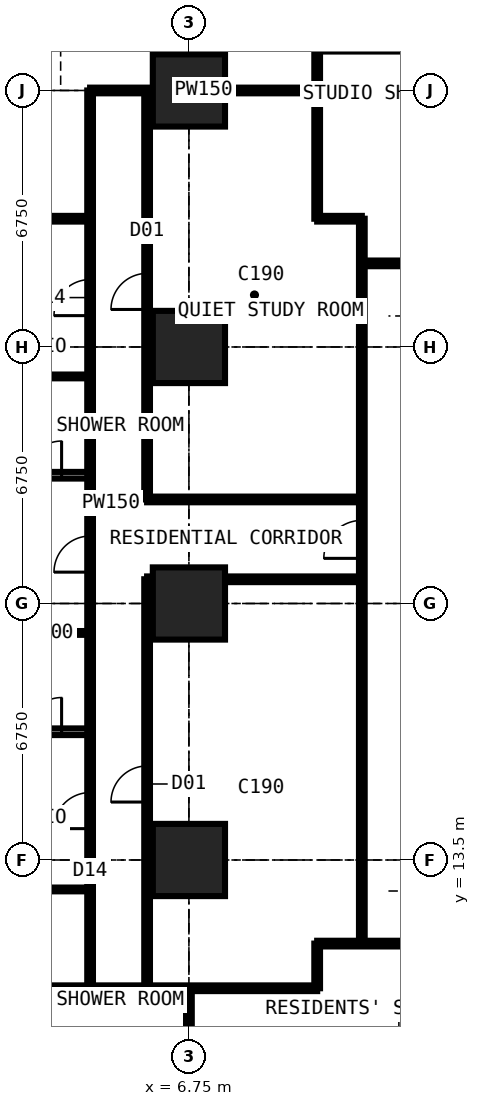
"""IFC4 building model, lengths in metres.
Left out: names, types, materials, properties, quantities, classifications, styles, units other than length and angle.
Written with IfcOpenShell. Run it as: python <this file> out.ifc"""

import sys

from ifc_helpers import new_model, si_unit, direction, frame, frame_2d, origin, origin_2d, place, context, subcontext, project, spatial, rectangle, extrude, element, fill, save


model = new_model("IFC4")
c1 = context("Model", 3, precision=1e-05, world=origin(), true_north=direction((0.0, 1.0)))
c2 = subcontext(c1, "Body", "Model", "MODEL_VIEW")
j1 = project(units=[si_unit("LENGTHUNIT", "METRE"), si_unit("PLANEANGLEUNIT", "RADIAN")], contexts=[c1])
p1 = place(None, origin())
s1 = spatial("IfcSite", under=j1, at=p1, CompositionType="ELEMENT")
p2 = place(p1, origin())
s2 = spatial("IfcBuilding", under=s1, at=p2, CompositionType="ELEMENT")
p3 = place(p2, frame((0.0, 0.0, 39.6)))
s3 = spatial("IfcBuildingStorey", under=s2, at=p3, CompositionType="ELEMENT", Elevation=39.6)
for number, where, z_axis, x_axis in (
    (1, (6.75, 13.5, 0.0), (0.0, 0.0, 1.0), (1.0, 0.0, 0.0)),
    (2, (6.75, 20.25, 0.0), (0.0, 0.0, 1.0), (1.0, 0.0, 0.0)),
    (3, (6.75, 27.0, 0.0), (0.0, 0.0, 1.0), (1.0, 0.0, 0.0)),
    (4, (6.75, 33.75, 0.0), (0.0, 0.0, 1.0), (1.0, 0.0, 0.0)),
):
    element("IfcColumn", number, at=place(p3, frame(where, z_axis=z_axis, x_axis=x_axis)), inside=s3, PredefinedType="COLUMN", context=c2, shape_type="SweptSolid", body=[
        extrude(rectangle(XDim=1.9, YDim=1.9, at=origin_2d()), origin(), (0.0, 0.0, 1.0), 3.6),
    ])
p4 = place(p3, frame((-0.734, 10.125, 0.0), z_axis=(0.0, 0.0, 1.0), x_axis=(1.0, 0.0, 0.0)))
e5 = element("IfcWall", 5, at=p4, inside=s3, PredefinedType="PARTITIONING", context=c2, shape_type="SweptSolid", body=[
    extrude(rectangle(XDim=10.859, YDim=0.15, at=frame_2d((5.429, 0.0))), origin(), (0.0, 0.0, 1.0), 3.375),
])
p5 = place(p3, frame((-0.734, 16.875, 0.0), z_axis=(0.0, 0.0, 1.0), x_axis=(1.0, 0.0, 0.0)))
e6 = element("IfcWall", 6, at=p5, inside=s3, PredefinedType="PARTITIONING", context=c2, shape_type="SweptSolid", body=[
    extrude(rectangle(XDim=4.884, YDim=0.175, at=frame_2d((2.442, 0.0))), origin(), (0.0, 0.0, 1.0), 3.375),
])
p6 = place(p5, frame((3.234, 0.0, 0.0)))
e7 = element("IfcOpeningElement", 7, at=p6, cuts=e6, PredefinedType="OPENING", context=c2, shape_type="SweptSolid", body=[
    extrude(rectangle(XDim=0.9, YDim=2.2, at=frame_2d((0.45, 1.1))), frame((0.0, 0.097, 0.0), z_axis=(0.0, -1.0, 0.0), x_axis=(1.0, 0.0, 0.0)), (0.0, 0.0, 1.0), 0.195),
])
p7 = place(p3, frame((-0.734, 23.625, 0.0), z_axis=(0.0, 0.0, 1.0), x_axis=(1.0, 0.0, 0.0)))
e8 = element("IfcWall", 8, at=p7, inside=s3, PredefinedType="PARTITIONING", context=c2, shape_type="SweptSolid", body=[
    extrude(rectangle(XDim=4.884, YDim=0.175, at=frame_2d((2.442, 0.0))), origin(), (0.0, 0.0, 1.0), 3.375),
])
p8 = place(p7, frame((3.234, 0.0, 0.0)))
e9 = element("IfcOpeningElement", 9, at=p8, cuts=e8, PredefinedType="OPENING", context=c2, shape_type="SweptSolid", body=[
    extrude(rectangle(XDim=0.9, YDim=2.2, at=frame_2d((0.45, 1.1))), frame((0.0, 0.097, 0.0), z_axis=(0.0, -1.0, 0.0), x_axis=(1.0, 0.0, 0.0)), (0.0, 0.0, 1.0), 0.195),
])
p9 = place(p3, frame((-0.734, 30.375, 0.0), z_axis=(0.0, 0.0, 1.0), x_axis=(1.0, 0.0, 0.0)))
e10 = element("IfcWall", 10, at=p9, inside=s3, PredefinedType="PARTITIONING", context=c2, shape_type="SweptSolid", body=[
    extrude(rectangle(XDim=4.884, YDim=0.15, at=frame_2d((2.442, 0.0))), origin(), (0.0, 0.0, 1.0), 3.375),
])
for number, where, z_axis, x_axis in (
    (11, (1.75, 12.725, 0.0), (0.0, 0.0, 1.0), (1.0, 0.0, 0.0)),
    (12, (1.75, 19.475, 0.0), (0.0, 0.0, 1.0), (1.0, 0.0, 0.0)),
    (13, (1.75, 26.225, 0.0), (0.0, 0.0, 1.0), (1.0, 0.0, 0.0)),
):
    element("IfcWall", number, at=place(p3, frame(where, z_axis=z_axis, x_axis=x_axis)), inside=s3, PredefinedType="PARTITIONING", context=c2, shape_type="SweptSolid", body=[
        extrude(rectangle(XDim=2.4, YDim=0.1, at=frame_2d((1.2, 0.0))), origin(), (0.0, 0.0, 1.0), 3.375),
    ])
p10 = place(p3, frame((4.15, 10.125, 0.0), z_axis=(0.0, 0.0, 1.0), x_axis=(0.0, 1.0, 0.0)))
e14 = element("IfcWall", 14, at=p10, inside=s3, PredefinedType="PARTITIONING", context=c2, shape_type="SweptSolid", body=[
    extrude(rectangle(XDim=23.625, YDim=0.15, at=frame_2d((11.812, 0.0))), origin(), (0.0, 0.0, 1.0), 3.375),
])
p11 = place(p10, frame((4.2, 0.0, 0.0)))
e15 = element("IfcOpeningElement", 15, at=p11, cuts=e14, PredefinedType="OPENING", context=c2, shape_type="SweptSolid", body=[
    extrude(rectangle(XDim=0.95, YDim=2.2, at=frame_2d((0.475, 1.1))), frame((0.0, 0.085, 0.0), z_axis=(0.0, -1.0, 0.0), x_axis=(1.0, 0.0, 0.0)), (0.0, 0.0, 1.0), 0.17),
])
p12 = place(p10, frame((10.95, 0.0, 0.0)))
e16 = element("IfcOpeningElement", 16, at=p12, cuts=e14, PredefinedType="OPENING", context=c2, shape_type="SweptSolid", body=[
    extrude(rectangle(XDim=0.95, YDim=2.2, at=frame_2d((0.475, 1.1))), frame((0.0, 0.085, 0.0), z_axis=(0.0, -1.0, 0.0), x_axis=(1.0, 0.0, 0.0)), (0.0, 0.0, 1.0), 0.17),
])
p13 = place(p10, frame((17.7, 0.0, 0.0)))
e17 = element("IfcOpeningElement", 17, at=p13, cuts=e14, PredefinedType="OPENING", context=c2, shape_type="SweptSolid", body=[
    extrude(rectangle(XDim=0.95, YDim=2.2, at=frame_2d((0.475, 1.1))), frame((0.0, 0.085, 0.0), z_axis=(0.0, -1.0, 0.0), x_axis=(1.0, 0.0, 0.0)), (0.0, 0.0, 1.0), 0.17),
])
p14 = place(p3, frame((4.15, 33.75, 0.0), z_axis=(0.0, 0.0, 1.0), x_axis=(1.0, 0.0, 0.0)))
e18 = element("IfcWall", 18, at=p14, inside=s3, PredefinedType="PARTITIONING", context=c2, shape_type="SweptSolid", body=[
    extrude(rectangle(XDim=5.975, YDim=0.15, at=frame_2d((2.988, 0.0))), origin(), (0.0, 0.0, 1.0), 2.877),
])
p15 = place(p3, frame((5.65, 10.125, 0.0), z_axis=(0.0, 0.0, 1.0), x_axis=(0.0, 1.0, 0.0)))
e19 = element("IfcWall", 19, at=p15, inside=s3, PredefinedType="PARTITIONING", context=c2, shape_type="SweptSolid", body=[
    extrude(rectangle(XDim=10.762, YDim=0.15, at=frame_2d((5.381, 0.0))), origin(), (0.0, 0.0, 1.0), 3.375),
])
p16 = place(p15, frame((4.9, 0.0, 0.0)))
e20 = element("IfcOpeningElement", 20, at=p16, cuts=e19, PredefinedType="OPENING", context=c2, shape_type="SweptSolid", body=[
    extrude(rectangle(XDim=0.95, YDim=2.2, at=frame_2d((0.475, 1.1))), frame((0.0, 0.085, 0.0), z_axis=(0.0, -1.0, 0.0), x_axis=(1.0, 0.0, 0.0)), (0.0, 0.0, 1.0), 0.17),
])
p17 = place(p3, frame((5.65, 20.887, 0.0), z_axis=(0.0, 0.0, 1.0), x_axis=(1.0, 0.0, 0.0)))
e21 = element("IfcWall", 21, at=p17, inside=s3, PredefinedType="PARTITIONING", context=c2, shape_type="SweptSolid", body=[
    extrude(rectangle(XDim=5.65, YDim=0.15, at=frame_2d((2.825, 0.0))), origin(), (0.0, 0.0, 1.0), 3.375),
])
p18 = place(p3, frame((5.65, 22.988, 0.0), z_axis=(0.0, 0.0, 1.0), x_axis=(0.0, 1.0, 0.0)))
e22 = element("IfcWall", 22, at=p18, inside=s3, PredefinedType="PARTITIONING", context=c2, shape_type="SweptSolid", body=[
    extrude(rectangle(XDim=10.762, YDim=0.15, at=frame_2d((5.381, 0.0))), origin(), (0.0, 0.0, 1.0), 3.375),
])
p19 = place(p18, frame((5.0, 0.0, 0.0)))
e23 = element("IfcOpeningElement", 23, at=p19, cuts=e22, PredefinedType="OPENING", context=c2, shape_type="SweptSolid", body=[
    extrude(rectangle(XDim=0.95, YDim=2.2, at=frame_2d((0.475, 1.1))), frame((0.0, 0.085, 0.0), z_axis=(0.0, -1.0, 0.0), x_axis=(1.0, 0.0, 0.0)), (0.0, 0.0, 1.0), 0.17),
])
p20 = place(p3, frame((5.65, 22.988, 0.0), z_axis=(0.0, 0.0, 1.0), x_axis=(1.0, 0.0, 0.0)))
e24 = element("IfcWall", 24, at=p20, inside=s3, PredefinedType="PARTITIONING", context=c2, shape_type="SweptSolid", body=[
    extrude(rectangle(XDim=5.65, YDim=0.15, at=frame_2d((2.825, 0.0))), origin(), (0.0, 0.0, 1.0), 3.375),
])
p21 = place(p3, frame((6.75, 4.15, 0.0), z_axis=(0.0, 0.0, 1.0), x_axis=(0.0, 1.0, 0.0)))
e25 = element("IfcWall", 25, at=p21, inside=s3, PredefinedType="PARTITIONING", context=c2, shape_type="SweptSolid", body=[
    extrude(rectangle(XDim=5.975, YDim=0.15, at=frame_2d((2.988, 0.0))), origin(), (0.0, 0.0, 1.0), 2.877),
])
p22 = place(p3, frame((10.125, 10.125, 0.0), z_axis=(0.0, 0.0, 1.0), x_axis=(0.0, 1.0, 0.0)))
e26 = element("IfcWall", 26, at=p22, inside=s3, PredefinedType="PARTITIONING", context=c2, shape_type="SweptSolid", body=[
    extrude(rectangle(XDim=1.175, YDim=0.15, at=frame_2d((0.587, 0.0))), origin(), (0.0, 0.0, 1.0), 3.375),
])
p23 = place(p3, frame((10.125, 11.3, 0.0), z_axis=(0.0, 0.0, 1.0), x_axis=(1.0, 0.0, 0.0)))
e27 = element("IfcWall", 27, at=p23, inside=s3, PredefinedType="PARTITIONING", context=c2, shape_type="SweptSolid", body=[
    extrude(rectangle(XDim=20.675, YDim=0.15, at=frame_2d((10.337, 0.0))), origin(), (0.0, 0.0, 1.0), 3.375),
])
p24 = place(p23, frame((8.375, 0.0, 0.0)))
e28 = element("IfcOpeningElement", 28, at=p24, cuts=e27, PredefinedType="OPENING", context=c2, shape_type="SweptSolid", body=[
    extrude(rectangle(XDim=1.0, YDim=2.2, at=frame_2d((0.5, 1.1))), frame((0.0, 0.085, 0.0), z_axis=(0.0, -1.0, 0.0), x_axis=(1.0, 0.0, 0.0)), (0.0, 0.0, 1.0), 0.17),
])
p25 = place(p23, frame((10.975, 0.0, 0.0)))
e29 = element("IfcOpeningElement", 29, at=p25, cuts=e27, PredefinedType="OPENING", context=c2, shape_type="SweptSolid", body=[
    extrude(rectangle(XDim=1.0, YDim=2.2, at=frame_2d((0.5, 1.1))), frame((0.0, 0.085, 0.0), z_axis=(0.0, -1.0, 0.0), x_axis=(1.0, 0.0, 0.0)), (0.0, 0.0, 1.0), 0.17),
])
p26 = place(p23, frame((3.925, 0.0, 0.0)))
e30 = element("IfcOpeningElement", 30, at=p26, cuts=e27, PredefinedType="OPENING", context=c2, shape_type="SweptSolid", body=[
    extrude(rectangle(XDim=0.95, YDim=2.2, at=frame_2d((0.475, 1.1))), frame((0.0, 0.085, 0.0), z_axis=(0.0, -1.0, 0.0), x_axis=(1.0, 0.0, 0.0)), (0.0, 0.0, 1.0), 0.17),
])
p27 = place(p3, frame((10.125, 30.375, 0.0), z_axis=(0.0, 0.0, 1.0), x_axis=(0.0, 1.0, 0.0)))
e31 = element("IfcWall", 31, at=p27, inside=s3, PredefinedType="PARTITIONING", context=c2, shape_type="SweptSolid", body=[
    extrude(rectangle(XDim=10.859, YDim=0.15, at=frame_2d((5.429, 0.0))), origin(), (0.0, 0.0, 1.0), 3.375),
])
p28 = place(p27, frame((4.725, 0.0, 0.0)))
e32 = element("IfcOpeningElement", 32, at=p28, cuts=e31, PredefinedType="OPENING", context=c2, shape_type="SweptSolid", body=[
    extrude(rectangle(XDim=1.0, YDim=2.2, at=frame_2d((0.5, 1.1))), frame((0.0, 0.085, 0.0), z_axis=(0.0, -1.0, 0.0), x_axis=(1.0, 0.0, 0.0)), (0.0, 0.0, 1.0), 0.17),
])
p29 = place(p3, frame((10.125, 30.375, 0.0), z_axis=(0.0, 0.0, 1.0), x_axis=(1.0, 0.0, 0.0)))
e33 = element("IfcWall", 33, at=p29, inside=s3, PredefinedType="PARTITIONING", context=c2, shape_type="SweptSolid", body=[
    extrude(rectangle(XDim=1.175, YDim=0.15, at=frame_2d((0.587, 0.0))), origin(), (0.0, 0.0, 1.0), 3.375),
])
p30 = place(p3, frame((11.3, 11.3, 0.0), z_axis=(0.0, 0.0, 1.0), x_axis=(0.0, 1.0, 0.0)))
e34 = element("IfcWall", 34, at=p30, inside=s3, PredefinedType="PARTITIONING", context=c2, shape_type="SweptSolid", body=[
    extrude(rectangle(XDim=19.075, YDim=0.15, at=frame_2d((9.538, 0.0))), origin(), (0.0, 0.0, 1.0), 3.375),
])
p31 = place(p30, frame((10.137, 0.0, 0.0)))
e35 = element("IfcOpeningElement", 35, at=p31, cuts=e34, PredefinedType="OPENING", context=c2, shape_type="SweptSolid", body=[
    extrude(rectangle(XDim=1.0, YDim=2.2, at=frame_2d((0.5, 1.1))), frame((0.0, 0.085, 0.0), z_axis=(0.0, -1.0, 0.0), x_axis=(1.0, 0.0, 0.0)), (0.0, 0.0, 1.0), 0.17),
])
p32 = place(p3, frame((11.3, 29.2, 0.0), z_axis=(0.0, 0.0, 1.0), x_axis=(1.0, 0.0, 0.0)))
e36 = element("IfcWall", 36, at=p32, inside=s3, PredefinedType="PARTITIONING", context=c2, shape_type="SweptSolid", body=[
    extrude(rectangle(XDim=19.075, YDim=0.15, at=frame_2d((9.538, 0.0))), origin(), (0.0, 0.0, 1.0), 3.375),
])
p33 = place(p32, frame((10.137, 0.0, 0.0)))
e37 = element("IfcOpeningElement", 37, at=p33, cuts=e36, PredefinedType="OPENING", context=c2, shape_type="SweptSolid", body=[
    extrude(rectangle(XDim=1.0, YDim=2.2, at=frame_2d((0.5, 1.1))), frame((0.0, 0.085, 0.0), z_axis=(0.0, -1.0, 0.0), x_axis=(1.0, 0.0, 0.0)), (0.0, 0.0, 1.0), 0.17),
])
p34 = place(p11, origin())
e38 = element("IfcDoor", 38, at=p34, inside=s3, OperationType="SINGLE_SWING_LEFT", PredefinedType="DOOR", context=c2, shape_type="SweptSolid", body=[
    extrude(rectangle(XDim=0.95, YDim=2.2, at=frame_2d((0.475, 1.1))), frame((0.0, 0.025, 0.0), z_axis=(0.0, -1.0, 0.0), x_axis=(1.0, 0.0, 0.0)), (0.0, 0.0, 1.0), 0.05),
])
fill(e15, e38)
p35 = place(p12, origin())
e39 = element("IfcDoor", 39, at=p35, inside=s3, OperationType="SINGLE_SWING_LEFT", PredefinedType="DOOR", context=c2, shape_type="SweptSolid", body=[
    extrude(rectangle(XDim=0.95, YDim=2.2, at=frame_2d((0.475, 1.1))), frame((0.0, 0.025, 0.0), z_axis=(0.0, -1.0, 0.0), x_axis=(1.0, 0.0, 0.0)), (0.0, 0.0, 1.0), 0.05),
])
fill(e16, e39)
p36 = place(p6, origin())
e40 = element("IfcDoor", 40, at=p36, inside=s3, OperationType="SINGLE_SWING_RIGHT", PredefinedType="DOOR", context=c2, shape_type="SweptSolid", body=[
    extrude(rectangle(XDim=0.9, YDim=2.2, at=frame_2d((0.45, 1.1))), frame((0.0, 0.025, 0.0), z_axis=(0.0, -1.0, 0.0), x_axis=(1.0, 0.0, 0.0)), (0.0, 0.0, 1.0), 0.05),
])
fill(e7, e40)
p37 = place(p13, origin())
e41 = element("IfcDoor", 41, at=p37, inside=s3, OperationType="SINGLE_SWING_LEFT", PredefinedType="DOOR", context=c2, shape_type="SweptSolid", body=[
    extrude(rectangle(XDim=0.95, YDim=2.2, at=frame_2d((0.475, 1.1))), frame((0.0, 0.025, 0.0), z_axis=(0.0, -1.0, 0.0), x_axis=(1.0, 0.0, 0.0)), (0.0, 0.0, 1.0), 0.05),
])
fill(e17, e41)
p38 = place(p8, origin())
e42 = element("IfcDoor", 42, at=p38, inside=s3, OperationType="SINGLE_SWING_RIGHT", PredefinedType="DOOR", context=c2, shape_type="SweptSolid", body=[
    extrude(rectangle(XDim=0.9, YDim=2.2, at=frame_2d((0.45, 1.1))), frame((0.0, 0.025, 0.0), z_axis=(0.0, -1.0, 0.0), x_axis=(1.0, 0.0, 0.0)), (0.0, 0.0, 1.0), 0.05),
])
fill(e9, e42)
p39 = place(p31, origin())
e43 = element("IfcDoor", 43, at=p39, inside=s3, OperationType="SINGLE_SWING_LEFT", PredefinedType="DOOR", context=c2, shape_type="SweptSolid", body=[
    extrude(rectangle(XDim=1.0, YDim=2.2, at=frame_2d((0.5, 1.1))), frame((0.0, 0.025, 0.0), z_axis=(0.0, -1.0, 0.0), x_axis=(1.0, 0.0, 0.0)), (0.0, 0.0, 1.0), 0.05),
])
fill(e35, e43)
p40 = place(p16, origin())
e44 = element("IfcDoor", 44, at=p40, inside=s3, OperationType="SINGLE_SWING_LEFT", PredefinedType="DOOR", context=c2, shape_type="SweptSolid", body=[
    extrude(rectangle(XDim=0.95, YDim=2.2, at=frame_2d((0.475, 1.1))), frame((0.0, 0.025, 0.0), z_axis=(0.0, -1.0, 0.0), x_axis=(1.0, 0.0, 0.0)), (0.0, 0.0, 1.0), 0.05),
])
fill(e20, e44)
p41 = place(p19, origin())
e45 = element("IfcDoor", 45, at=p41, inside=s3, OperationType="SINGLE_SWING_LEFT", PredefinedType="DOOR", context=c2, shape_type="SweptSolid", body=[
    extrude(rectangle(XDim=0.95, YDim=2.2, at=frame_2d((0.475, 1.1))), frame((0.0, 0.025, 0.0), z_axis=(0.0, -1.0, 0.0), x_axis=(1.0, 0.0, 0.0)), (0.0, 0.0, 1.0), 0.05),
])
fill(e23, e45)
save(model, sys.argv[1])
